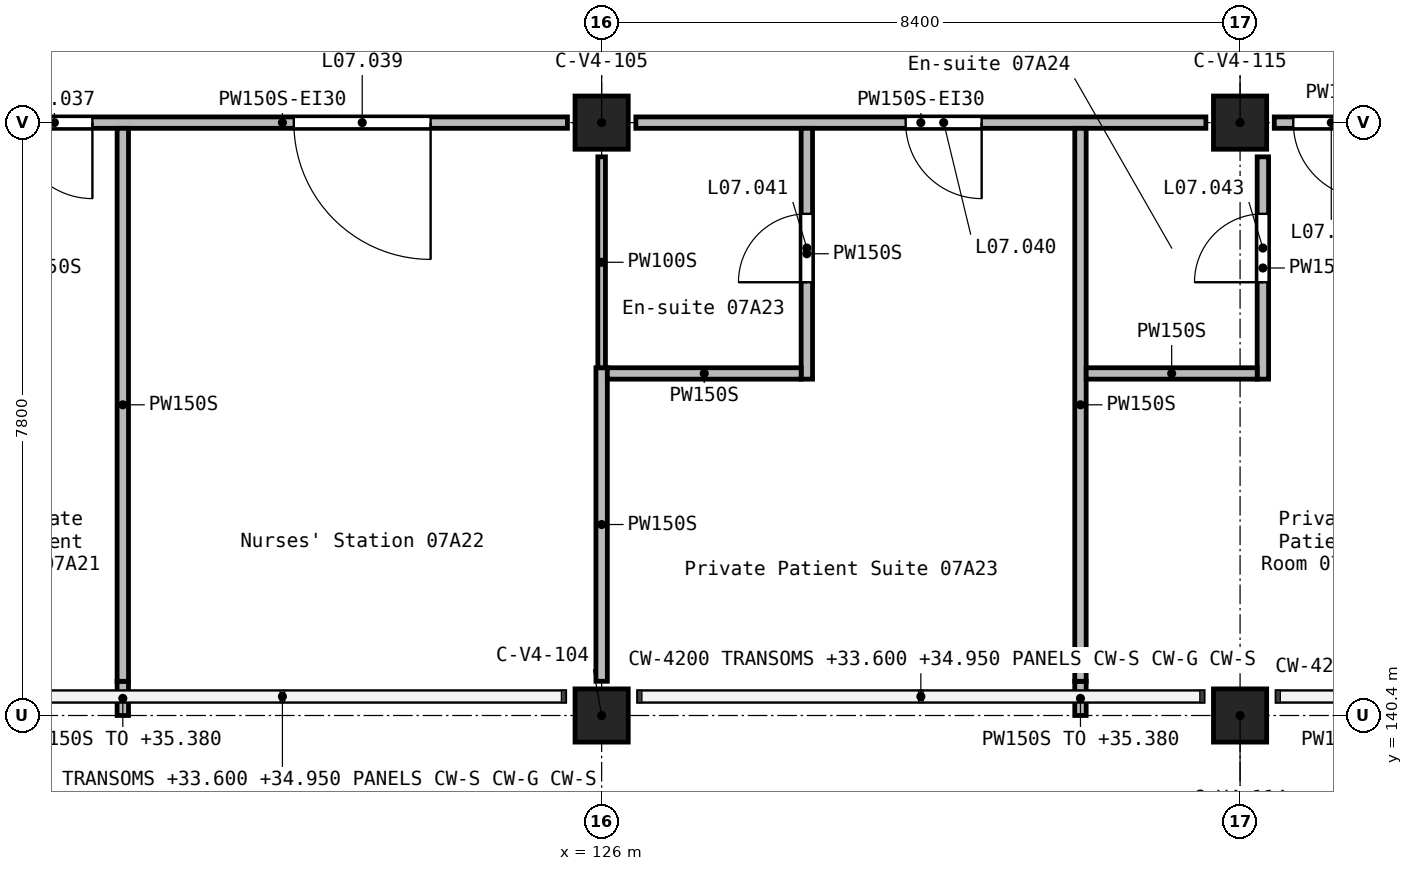
"""IFC4 building model, lengths in metres.
Left out: names, types, materials, properties, quantities, classifications, styles, units other than length and angle.
Written with IfcOpenShell. Run it as: python <this file> out.ifc"""

import sys

from ifc_helpers import new_model, si_unit, direction, frame, frame_2d, origin, origin_2d, place, context, subcontext, project, spatial, rectangle, extrude, element, fill, save


model = new_model("IFC4")
c1 = context("Model", 3, precision=1e-05, world=origin(), true_north=direction((0.0, 1.0)))
c2 = subcontext(c1, "Body", "Model", "MODEL_VIEW")
j1 = project(units=[si_unit("LENGTHUNIT", "METRE"), si_unit("PLANEANGLEUNIT", "RADIAN")], contexts=[c1])
p1 = place(None, origin())
s1 = spatial("IfcSite", under=j1, at=p1, CompositionType="ELEMENT")
p2 = place(p1, origin())
s2 = spatial("IfcBuilding", under=s1, at=p2, CompositionType="ELEMENT")
p3 = place(p2, frame((0.0, 0.0, 32.7)))
s3 = spatial("IfcBuildingStorey", under=s2, at=p3, CompositionType="ELEMENT", Elevation=32.7)
for number, where, z_axis, x_axis in (
    (1, (126.0, 140.4, 0.0), (0.0, 0.0, 1.0), (1.0, 0.0, 0.0)),
    (2, (126.0, 148.2, 0.0), (0.0, 0.0, 1.0), (1.0, 0.0, 0.0)),
    (3, (134.4, 140.4, 0.0), (0.0, 0.0, 1.0), (1.0, 0.0, 0.0)),
    (4, (134.4, 148.2, 0.0), (0.0, 0.0, 1.0), (1.0, 0.0, 0.0)),
):
    element("IfcColumn", number, at=place(p3, frame(where, z_axis=z_axis, x_axis=x_axis)), inside=s3, PredefinedType="COLUMN", context=c2, shape_type="SweptSolid", body=[
        extrude(rectangle(XDim=0.7, YDim=0.7, at=origin_2d()), origin(), (0.0, 0.0, 1.0), 3.9),
    ])
p4 = place(p3, frame((136.575, 148.2, 0.0), z_axis=(0.0, 0.0, 1.0), x_axis=(-1.0, 0.0, 0.0)))
e5 = element("IfcWall", 5, at=p4, inside=s3, PredefinedType="PARTITIONING", context=c2, shape_type="SweptSolid", body=[
    extrude(rectangle(XDim=1.725, YDim=0.15, at=frame_2d((0.862, 0.0))), origin(), (0.0, 0.0, 1.0), 3.6),
])
p5 = place(p4, frame((0.475, 0.0, 0.0)))
e6 = element("IfcOpeningElement", 6, at=p5, cuts=e5, PredefinedType="OPENING", context=c2, shape_type="SweptSolid", body=[
    extrude(rectangle(XDim=1.0, YDim=2.1, at=frame_2d((0.5, 1.05))), frame((0.0, 0.085, 0.0), z_axis=(0.0, -1.0, 0.0), x_axis=(1.0, 0.0, 0.0)), (0.0, 0.0, 1.0), 0.17),
])
p6 = place(p3, frame((133.95, 148.2, 0.0), z_axis=(0.0, 0.0, 1.0), x_axis=(-1.0, 0.0, 0.0)))
e7 = element("IfcWall", 7, at=p6, inside=s3, PredefinedType="PARTITIONING", context=c2, shape_type="SweptSolid", body=[
    extrude(rectangle(XDim=7.5, YDim=0.15, at=frame_2d((3.75, 0.0))), origin(), (0.0, 0.0, 1.0), 3.6),
])
p7 = place(p6, frame((2.95, 0.0, 0.0)))
e8 = element("IfcOpeningElement", 8, at=p7, cuts=e7, PredefinedType="OPENING", context=c2, shape_type="SweptSolid", body=[
    extrude(rectangle(XDim=1.0, YDim=2.1, at=frame_2d((0.5, 1.05))), frame((0.0, 0.085, 0.0), z_axis=(0.0, -1.0, 0.0), x_axis=(1.0, 0.0, 0.0)), (0.0, 0.0, 1.0), 0.17),
])
p8 = place(p3, frame((125.55, 148.2, 0.0), z_axis=(0.0, 0.0, 1.0), x_axis=(-1.0, 0.0, 0.0)))
e9 = element("IfcWall", 9, at=p8, inside=s3, PredefinedType="PARTITIONING", context=c2, shape_type="SweptSolid", body=[
    extrude(rectangle(XDim=7.5, YDim=0.15, at=frame_2d((3.75, 0.0))), origin(), (0.0, 0.0, 1.0), 3.6),
])
p9 = place(p8, frame((6.25, 0.0, 0.0)))
e10 = element("IfcOpeningElement", 10, at=p9, cuts=e9, PredefinedType="OPENING", context=c2, shape_type="SweptSolid", body=[
    extrude(rectangle(XDim=1.0, YDim=2.1, at=frame_2d((0.5, 1.05))), frame((0.0, 0.085, 0.0), z_axis=(0.0, -1.0, 0.0), x_axis=(1.0, 0.0, 0.0)), (0.0, 0.0, 1.0), 0.17),
])
p10 = place(p8, frame((1.8, 0.0, 0.0)))
e11 = element("IfcOpeningElement", 11, at=p10, cuts=e9, PredefinedType="OPENING", context=c2, shape_type="SweptSolid", body=[
    extrude(rectangle(XDim=1.8, YDim=2.1, at=frame_2d((0.9, 1.05))), frame((0.0, 0.085, 0.0), z_axis=(0.0, -1.0, 0.0), x_axis=(1.0, 0.0, 0.0)), (0.0, 0.0, 1.0), 0.17),
])
p11 = place(p3, frame((119.7, 140.4, 0.0), z_axis=(0.0, 0.0, 1.0), x_axis=(0.0, 1.0, 0.0)))
e12 = element("IfcWall", 12, at=p11, inside=s3, PredefinedType="PARTITIONING", context=c2, shape_type="SweptSolid", body=[
    extrude(rectangle(XDim=0.45, YDim=0.15, at=frame_2d((0.225, 0.0))), origin(), (0.0, 0.0, 1.0), 2.68),
])
p12 = place(p3, frame((119.7, 140.85, 0.0), z_axis=(0.0, 0.0, 1.0), x_axis=(0.0, 1.0, 0.0)))
e13 = element("IfcWall", 13, at=p12, inside=s3, PredefinedType="PARTITIONING", context=c2, shape_type="SweptSolid", body=[
    extrude(rectangle(XDim=7.275, YDim=0.15, at=frame_2d((3.637, 0.0))), origin(), (0.0, 0.0, 1.0), 3.6),
])
p13 = place(p3, frame((132.3, 140.4, 0.0), z_axis=(0.0, 0.0, 1.0), x_axis=(0.0, 1.0, 0.0)))
e14 = element("IfcWall", 14, at=p13, inside=s3, PredefinedType="PARTITIONING", context=c2, shape_type="SweptSolid", body=[
    extrude(rectangle(XDim=0.45, YDim=0.15, at=frame_2d((0.225, 0.0))), origin(), (0.0, 0.0, 1.0), 2.68),
])
p14 = place(p3, frame((132.3, 140.85, 0.0), z_axis=(0.0, 0.0, 1.0), x_axis=(0.0, 1.0, 0.0)))
e15 = element("IfcWall", 15, at=p14, inside=s3, PredefinedType="PARTITIONING", context=c2, shape_type="SweptSolid", body=[
    extrude(rectangle(XDim=7.275, YDim=0.15, at=frame_2d((3.637, 0.0))), origin(), (0.0, 0.0, 1.0), 3.6),
])
p15 = place(p3, frame((126.0, 140.85, 0.0), z_axis=(0.0, 0.0, 1.0), x_axis=(0.0, 1.0, 0.0)))
e16 = element("IfcWall", 16, at=p15, inside=s3, PredefinedType="PARTITIONING", context=c2, shape_type="SweptSolid", body=[
    extrude(rectangle(XDim=4.125, YDim=0.15, at=frame_2d((2.062, 0.0))), origin(), (0.0, 0.0, 1.0), 3.6),
])
p16 = place(p3, frame((128.7, 144.825, 0.0), z_axis=(0.0, 0.0, 1.0), x_axis=(0.0, 1.0, 0.0)))
e17 = element("IfcWall", 17, at=p16, inside=s3, PredefinedType="PARTITIONING", context=c2, shape_type="SweptSolid", body=[
    extrude(rectangle(XDim=3.3, YDim=0.15, at=frame_2d((1.65, 0.0))), origin(), (0.0, 0.0, 1.0), 3.6),
])
p17 = place(p16, frame((1.275, 0.0, 0.0)))
e18 = element("IfcOpeningElement", 18, at=p17, cuts=e17, PredefinedType="OPENING", context=c2, shape_type="SweptSolid", body=[
    extrude(rectangle(XDim=0.9, YDim=2.1, at=frame_2d((0.45, 1.05))), frame((0.0, 0.085, 0.0), z_axis=(0.0, -1.0, 0.0), x_axis=(1.0, 0.0, 0.0)), (0.0, 0.0, 1.0), 0.17),
])
p18 = place(p3, frame((134.7, 144.825, 0.0), z_axis=(0.0, 0.0, 1.0), x_axis=(0.0, 1.0, 0.0)))
e19 = element("IfcWall", 19, at=p18, inside=s3, PredefinedType="PARTITIONING", context=c2, shape_type="SweptSolid", body=[
    extrude(rectangle(XDim=2.925, YDim=0.15, at=frame_2d((1.462, 0.0))), origin(), (0.0, 0.0, 1.0), 3.6),
])
p19 = place(p18, frame((1.275, 0.0, 0.0)))
e20 = element("IfcOpeningElement", 20, at=p19, cuts=e19, PredefinedType="OPENING", context=c2, shape_type="SweptSolid", body=[
    extrude(rectangle(XDim=0.9, YDim=2.1, at=frame_2d((0.45, 1.05))), frame((0.0, 0.085, 0.0), z_axis=(0.0, -1.0, 0.0), x_axis=(1.0, 0.0, 0.0)), (0.0, 0.0, 1.0), 0.17),
])
p20 = place(p3, frame((126.075, 144.9, 0.0), z_axis=(0.0, 0.0, 1.0), x_axis=(1.0, 0.0, 0.0)))
e21 = element("IfcWall", 21, at=p20, inside=s3, PredefinedType="PARTITIONING", context=c2, shape_type="SweptSolid", body=[
    extrude(rectangle(XDim=2.55, YDim=0.15, at=frame_2d((1.275, 0.0))), origin(), (0.0, 0.0, 1.0), 3.6),
])
p21 = place(p3, frame((132.375, 144.9, 0.0), z_axis=(0.0, 0.0, 1.0), x_axis=(1.0, 0.0, 0.0)))
e22 = element("IfcWall", 22, at=p21, inside=s3, PredefinedType="PARTITIONING", context=c2, shape_type="SweptSolid", body=[
    extrude(rectangle(XDim=2.25, YDim=0.15, at=frame_2d((1.125, 0.0))), origin(), (0.0, 0.0, 1.0), 3.6),
])
p22 = place(p3, frame((126.0, 144.975, 0.0), z_axis=(0.0, 0.0, 1.0), x_axis=(0.0, 1.0, 0.0)))
e23 = element("IfcWall", 23, at=p22, inside=s3, PredefinedType="PARTITIONING", context=c2, shape_type="SweptSolid", body=[
    extrude(rectangle(XDim=2.775, YDim=0.1, at=frame_2d((1.387, 0.0))), origin(), (0.0, 0.0, 1.0), 3.6),
])
p23 = place(p9, origin())
e24 = element("IfcDoor", 24, at=p23, inside=s3, OperationType="SINGLE_SWING_RIGHT", PredefinedType="DOOR", context=c2, shape_type="SweptSolid", body=[
    extrude(rectangle(XDim=1.0, YDim=2.1, at=frame_2d((0.5, 1.05))), frame((0.0, 0.025, 0.0), z_axis=(0.0, -1.0, 0.0), x_axis=(1.0, 0.0, 0.0)), (0.0, 0.0, 1.0), 0.05),
])
fill(e10, e24)
p24 = place(p10, origin())
e25 = element("IfcDoor", 25, at=p24, inside=s3, OperationType="DOUBLE_DOOR_SINGLE_SWING", PredefinedType="DOOR", context=c2, shape_type="SweptSolid", body=[
    extrude(rectangle(XDim=1.8, YDim=2.1, at=frame_2d((0.9, 1.05))), frame((0.0, 0.025, 0.0), z_axis=(0.0, -1.0, 0.0), x_axis=(1.0, 0.0, 0.0)), (0.0, 0.0, 1.0), 0.05),
])
fill(e11, e25)
p25 = place(p7, origin())
e26 = element("IfcDoor", 26, at=p25, inside=s3, OperationType="SINGLE_SWING_LEFT", PredefinedType="DOOR", context=c2, shape_type="SweptSolid", body=[
    extrude(rectangle(XDim=1.0, YDim=2.1, at=frame_2d((0.5, 1.05))), frame((0.0, 0.025, 0.0), z_axis=(0.0, -1.0, 0.0), x_axis=(1.0, 0.0, 0.0)), (0.0, 0.0, 1.0), 0.05),
])
fill(e8, e26)
p26 = place(p17, origin())
e27 = element("IfcDoor", 27, at=p26, inside=s3, OperationType="SINGLE_SWING_RIGHT", PredefinedType="DOOR", context=c2, shape_type="SweptSolid", body=[
    extrude(rectangle(XDim=0.9, YDim=2.1, at=frame_2d((0.45, 1.05))), frame((0.0, 0.025, 0.0), z_axis=(0.0, -1.0, 0.0), x_axis=(1.0, 0.0, 0.0)), (0.0, 0.0, 1.0), 0.05),
])
fill(e18, e27)
p27 = place(p5, origin())
e28 = element("IfcDoor", 28, at=p27, inside=s3, OperationType="SINGLE_SWING_RIGHT", PredefinedType="DOOR", context=c2, shape_type="SweptSolid", body=[
    extrude(rectangle(XDim=1.0, YDim=2.1, at=frame_2d((0.5, 1.05))), frame((0.0, 0.025, 0.0), z_axis=(0.0, -1.0, 0.0), x_axis=(1.0, 0.0, 0.0)), (0.0, 0.0, 1.0), 0.05),
])
fill(e6, e28)
p28 = place(p19, origin())
e29 = element("IfcDoor", 29, at=p28, inside=s3, OperationType="SINGLE_SWING_RIGHT", PredefinedType="DOOR", context=c2, shape_type="SweptSolid", body=[
    extrude(rectangle(XDim=0.9, YDim=2.1, at=frame_2d((0.45, 1.05))), frame((0.0, 0.025, 0.0), z_axis=(0.0, -1.0, 0.0), x_axis=(1.0, 0.0, 0.0)), (0.0, 0.0, 1.0), 0.05),
])
fill(e20, e29)
save(model, sys.argv[1])
